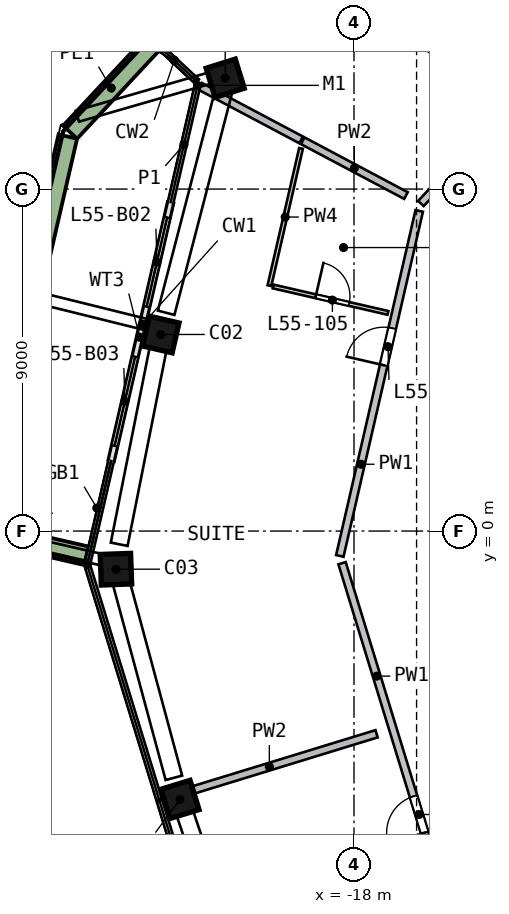
"""IFC4 building model, lengths in metres.
Left out: names, types, materials, properties, quantities, classifications, styles, units other than length and angle.
Written with IfcOpenShell. Run it as: python <this file> out.ifc"""

import sys

from ifc_helpers import new_model, si_unit, direction, frame, frame_2d, origin, origin_2d, place, context, subcontext, project, spatial, rectangle, extrude, element, fill, save


model = new_model("IFC4")
c1 = context("Model", 3, precision=1e-05, world=origin(), true_north=direction((0.0, 1.0)))
c2 = subcontext(c1, "Body", "Model", "MODEL_VIEW")
j1 = project(units=[si_unit("LENGTHUNIT", "METRE"), si_unit("PLANEANGLEUNIT", "RADIAN")], contexts=[c1])
p1 = place(None, origin())
s1 = spatial("IfcSite", under=j1, at=p1, CompositionType="ELEMENT")
p2 = place(p1, origin())
s2 = spatial("IfcBuilding", under=s1, at=p2, CompositionType="ELEMENT")
p3 = place(p2, frame((0.0, 0.0, 227.0)))
s3 = spatial("IfcBuildingStorey", under=s2, at=p3, CompositionType="ELEMENT", Elevation=227.0)
p4 = place(p3, frame((-21.322, 12.039, 0.0), z_axis=(-0.056402373, -0.101858733, 0.993198656), x_axis=(-0.298505491, 0.951000235, 0.080579308)))
e1 = element("IfcColumn", 1, at=p4, inside=s3, PredefinedType="COLUMN", context=c2, shape_type="SweptSolid", body=[
    extrude(rectangle(XDim=0.8, YDim=0.8, at=origin_2d()), origin(), (0.0, 0.0, 1.0), 3.212),
])
p5 = place(p3, frame((-23.056, 5.306, 0.0), z_axis=(-0.024335425, -0.109889655, 0.993645838), x_axis=(-0.223065624, -0.9682844, -0.112547984)))
e2 = element("IfcColumn", 2, at=p5, inside=s3, PredefinedType="COLUMN", context=c2, shape_type="SweptSolid", body=[
    extrude(rectangle(XDim=0.8, YDim=0.8, at=origin_2d()), origin(), (0.0, 0.0, 1.0), 3.21),
])
p6 = place(p3, frame((-24.271, -0.865, 0.0), z_axis=(0.005093486, -0.115401674, 0.993305849), x_axis=(-0.035372235, 0.992676314, 0.115509918)))
e3 = element("IfcColumn", 3, at=p6, inside=s3, PredefinedType="COLUMN", context=c2, shape_type="SweptSolid", body=[
    extrude(rectangle(XDim=0.8, YDim=0.8, at=origin_2d()), origin(), (0.0, 0.0, 1.0), 3.211),
])
p7 = place(p3, frame((-22.62, -6.933, 0.0), z_axis=(0.033841596, -0.107304475, 0.993650087), x_axis=(0.290813838, -0.950141415, -0.112510462)))
e4 = element("IfcColumn", 4, at=p7, inside=s3, PredefinedType="COLUMN", context=c2, shape_type="SweptSolid", body=[
    extrude(rectangle(XDim=0.8, YDim=0.8, at=origin_2d()), origin(), (0.0, 0.0, 1.0), 3.21),
])
p8 = place(p3, frame((-22.827, 8.64, 0.0), z_axis=(0.0, 0.0, 1.0), x_axis=(-0.224302968, -0.97451946, 0.0)))
e5 = element("IfcWall", 5, at=p8, inside=s3, PredefinedType="SOLIDWALL", context=c2, shape_type="SweptSolid", body=[
    extrude(rectangle(XDim=3.3, YDim=0.15, at=frame_2d((1.65, 0.0))), origin(), (0.0, 0.0, 1.0), 2.525),
])
p9 = place(p8, frame((0.4, 0.0, 0.0)))
e6 = element("IfcOpeningElement", 6, at=p9, cuts=e5, PredefinedType="OPENING", context=c2, shape_type="SweptSolid", body=[
    extrude(rectangle(XDim=2.4, YDim=2.4, at=frame_2d((1.2, 1.2))), frame((0.0, 0.085, 0.0), z_axis=(0.0, -1.0, 0.0), x_axis=(1.0, 0.0, 0.0)), (0.0, 0.0, 1.0), 0.17),
])
p10 = place(p3, frame((-23.567, 5.424, 0.0), z_axis=(0.0, 0.0, 1.0), x_axis=(-0.224260426, -0.974529251, 0.0)))
e7 = element("IfcWall", 7, at=p10, inside=s3, PredefinedType="SOLIDWALL", context=c2, shape_type="SweptSolid", body=[
    extrude(rectangle(XDim=3.661, YDim=0.15, at=frame_2d((1.831, 0.0))), origin(), (0.0, 0.0, 1.0), 2.525),
])
p11 = place(p10, frame((0.861, 0.0, 0.0)))
e8 = element("IfcOpeningElement", 8, at=p11, cuts=e7, PredefinedType="OPENING", context=c2, shape_type="SweptSolid", body=[
    extrude(rectangle(XDim=2.4, YDim=2.4, at=frame_2d((1.2, 1.2))), frame((0.0, 0.085, 0.0), z_axis=(0.0, -1.0, 0.0), x_axis=(1.0, 0.0, 0.0)), (0.0, 0.0, 1.0), 0.17),
])
p12 = place(p3, frame((-23.306, 12.819, 0.0), z_axis=(0.0, 0.0, 1.0), x_axis=(-0.681520764, -0.731798776, 0.0)))
e9 = element("IfcWall", 9, at=p12, inside=s3, PredefinedType="SOLIDWALL", context=c2, shape_type="SweptSolid", body=[
    extrude(rectangle(XDim=3.176, YDim=0.5, at=frame_2d((1.588, 0.0))), origin(), (0.0, 0.0, 1.0), 0.7),
])
p13 = place(p3, frame((-25.531, 10.381, 0.0), z_axis=(0.0, 0.0, 1.0), x_axis=(-0.224268414, -0.974527413, 0.0)))
e10 = element("IfcWall", 10, at=p13, inside=s3, PredefinedType="SOLIDWALL", context=c2, shape_type="SweptSolid", body=[
    extrude(rectangle(XDim=10.89, YDim=0.5, at=frame_2d((5.445, 0.0))), origin(), (0.0, 0.0, 1.0), 0.7),
])
p14 = place(p3, frame((-27.673, -0.045, 0.0), z_axis=(0.0, 0.0, 1.0), x_axis=(0.974535819, -0.224231882, 0.0)))
e11 = element("IfcWall", 11, at=p14, inside=s3, PredefinedType="SOLIDWALL", context=c2, shape_type="SweptSolid", body=[
    extrude(rectangle(XDim=2.699, YDim=0.5, at=frame_2d((1.35, 0.0))), origin(), (0.0, 0.0, 1.0), 0.7),
])
p15 = place(p3, frame((-18.373, -0.654, 0.0), z_axis=(0.0, 0.0, 1.0), x_axis=(0.224277617, 0.974525295, 0.0)))
e12 = element("IfcWall", 12, at=p15, inside=s3, PredefinedType="SOLIDWALL", context=c2, shape_type="SweptSolid", body=[
    extrude(rectangle(XDim=9.316, YDim=0.2, at=frame_2d((4.658, 0.0))), origin(), (0.0, 0.0, 1.0), 3.19),
])
p16 = place(p15, frame((5.15, 0.0, 0.0)))
e13 = element("IfcOpeningElement", 13, at=p16, cuts=e12, PredefinedType="OPENING", context=c2, shape_type="SweptSolid", body=[
    extrude(rectangle(XDim=1.0, YDim=2.1, at=frame_2d((0.5, 1.05))), frame((0.0, 0.11, 0.0), z_axis=(0.0, -1.0, 0.0), x_axis=(1.0, 0.0, 0.0)), (0.0, 0.0, 1.0), 0.22),
])
p17 = place(p3, frame((-15.584, -9.753, 0.0), z_axis=(0.0, 0.0, 1.0), x_axis=(-0.293036013, 0.956101404, 0.0)))
e14 = element("IfcWall", 14, at=p17, inside=s3, PredefinedType="SOLIDWALL", context=c2, shape_type="SweptSolid", body=[
    extrude(rectangle(XDim=9.316, YDim=0.2, at=frame_2d((4.658, 0.0))), origin(), (0.0, 0.0, 1.0), 3.19),
])
p18 = place(p17, frame((1.9, 0.0, 0.0)))
e15 = element("IfcOpeningElement", 15, at=p18, cuts=e14, PredefinedType="OPENING", context=c2, shape_type="SweptSolid", body=[
    extrude(rectangle(XDim=1.0, YDim=2.1, at=frame_2d((0.5, 1.05))), frame((0.0, 0.11, 0.0), z_axis=(0.0, -1.0, 0.0), x_axis=(1.0, 0.0, 0.0)), (0.0, 0.0, 1.0), 0.22),
])
p19 = place(p3, frame((-16.239, 8.62, 0.0), z_axis=(0.0, 0.0, 1.0), x_axis=(0.681478707, 0.731837941, 0.0)))
e16 = element("IfcWall", 16, at=p19, inside=s3, PredefinedType="SOLIDWALL", context=c2, shape_type="SweptSolid", body=[
    extrude(rectangle(XDim=9.517, YDim=0.2, at=frame_2d((4.758, 0.0))), origin(), (0.0, 0.0, 1.0), 3.19),
])
p20 = place(p19, frame((3.865, 0.0, 0.0)))
e17 = element("IfcOpeningElement", 17, at=p20, cuts=e16, PredefinedType="OPENING", context=c2, shape_type="SweptSolid", body=[
    extrude(rectangle(XDim=1.8, YDim=2.1, at=frame_2d((0.9, 1.05))), frame((0.0, 0.11, 0.0), z_axis=(0.0, -1.0, 0.0), x_axis=(1.0, 0.0, 0.0)), (0.0, 0.0, 1.0), 0.22),
])
p21 = place(p3, frame((-19.39, 10.292, 0.0), z_axis=(0.0, 0.0, 1.0), x_axis=(-0.883248988, 0.468904281, 0.0)))
e18 = element("IfcWall", 18, at=p21, inside=s3, PredefinedType="SOLIDWALL", context=c2, shape_type="SweptSolid", body=[
    extrude(rectangle(XDim=3.011, YDim=0.2, at=frame_2d((1.506, 0.0))), origin(), (0.0, 0.0, 1.0), 3.19),
])
p22 = place(p3, frame((-17.406, -5.335, 0.0), z_axis=(0.0, 0.0, 1.0), x_axis=(-0.956095937, -0.293053849, 0.0)))
e19 = element("IfcWall", 19, at=p22, inside=s3, PredefinedType="SOLIDWALL", context=c2, shape_type="SweptSolid", body=[
    extrude(rectangle(XDim=5.902, YDim=0.2, at=frame_2d((2.951, 0.0))), origin(), (0.0, 0.0, 1.0), 3.19),
])
p23 = place(p3, frame((-14.229, 11.072, 0.0), z_axis=(0.0, 0.0, 1.0), x_axis=(-0.731837547, 0.68147913, 0.0)))
e20 = element("IfcWall", 20, at=p23, inside=s3, PredefinedType="SOLIDWALL", context=c2, shape_type="SweptSolid", body=[
    extrude(rectangle(XDim=11.533, YDim=0.2, at=frame_2d((5.767, 0.0))), origin(), (0.0, 0.0, 1.0), 3.19),
])
p24 = place(p23, frame((3.45, 0.0, 0.0)))
e21 = element("IfcOpeningElement", 21, at=p24, cuts=e20, PredefinedType="OPENING", context=c2, shape_type="SweptSolid", body=[
    extrude(rectangle(XDim=1.0, YDim=2.1, at=frame_2d((0.5, 1.05))), frame((0.0, 0.11, 0.0), z_axis=(0.0, -1.0, 0.0), x_axis=(1.0, 0.0, 0.0)), (0.0, 0.0, 1.0), 0.22),
])
p25 = place(p3, frame((-16.634, 8.83, 0.0), z_axis=(0.0, 0.0, 1.0), x_axis=(-0.883300707, 0.468806848, 0.0)))
e22 = element("IfcWall", 22, at=p25, inside=s3, PredefinedType="SOLIDWALL", context=c2, shape_type="SweptSolid", body=[
    extrude(rectangle(XDim=3.075, YDim=0.2, at=frame_2d((1.537, 0.0))), origin(), (0.0, 0.0, 1.0), 3.19),
])
p26 = place(p3, frame((-20.225, 6.459, 0.0), z_axis=(0.0, 0.0, 1.0), x_axis=(0.224301063, 0.974519899, 0.0)))
e23 = element("IfcWall", 23, at=p26, inside=s3, PredefinedType="PARTITIONING", context=c2, shape_type="SweptSolid", body=[
    extrude(rectangle(XDim=3.704, YDim=0.1, at=frame_2d((1.852, 0.0))), origin(), (0.0, 0.0, 1.0), 3.19),
])
p27 = place(p3, frame((-20.128, 6.436, 0.0), z_axis=(0.0, 0.0, 1.0), x_axis=(0.974542283, -0.224203788, 0.0)))
e24 = element("IfcWall", 24, at=p27, inside=s3, PredefinedType="PARTITIONING", context=c2, shape_type="SweptSolid", body=[
    extrude(rectangle(XDim=3.1, YDim=0.1, at=frame_2d((1.55, 0.0))), origin(), (0.0, 0.0, 1.0), 3.19),
])
p28 = place(p27, frame((1.15, 0.0, 0.0)))
e25 = element("IfcOpeningElement", 25, at=p28, cuts=e24, PredefinedType="OPENING", context=c2, shape_type="SweptSolid", body=[
    extrude(rectangle(XDim=0.9, YDim=2.1, at=frame_2d((0.45, 1.05))), frame((0.0, 0.06, 0.0), z_axis=(0.0, -1.0, 0.0), x_axis=(1.0, 0.0, 0.0)), (0.0, 0.0, 1.0), 0.12),
])
p29 = place(p9, origin())
e26 = element("IfcDoor", 26, at=p29, inside=s3, OperationType="SLIDING_TO_RIGHT", PredefinedType="DOOR", context=c2, shape_type="SweptSolid", body=[
    extrude(rectangle(XDim=2.4, YDim=2.4, at=frame_2d((1.2, 1.2))), frame((0.0, 0.025, 0.0), z_axis=(0.0, -1.0, 0.0), x_axis=(1.0, 0.0, 0.0)), (0.0, 0.0, 1.0), 0.05),
])
fill(e6, e26)
p30 = place(p11, origin())
e27 = element("IfcDoor", 27, at=p30, inside=s3, OperationType="SLIDING_TO_LEFT", PredefinedType="DOOR", context=c2, shape_type="SweptSolid", body=[
    extrude(rectangle(XDim=2.4, YDim=2.4, at=frame_2d((1.2, 1.2))), frame((0.0, 0.025, 0.0), z_axis=(0.0, -1.0, 0.0), x_axis=(1.0, 0.0, 0.0)), (0.0, 0.0, 1.0), 0.05),
])
fill(e8, e27)
p31 = place(p16, origin())
e28 = element("IfcDoor", 28, at=p31, inside=s3, OperationType="SINGLE_SWING_LEFT", PredefinedType="DOOR", context=c2, shape_type="SweptSolid", body=[
    extrude(rectangle(XDim=1.0, YDim=2.1, at=frame_2d((0.5, 1.05))), frame((0.0, 0.025, 0.0), z_axis=(0.0, -1.0, 0.0), x_axis=(1.0, 0.0, 0.0)), (0.0, 0.0, 1.0), 0.05),
])
fill(e13, e28)
p32 = place(p28, origin())
e29 = element("IfcDoor", 29, at=p32, inside=s3, OperationType="SINGLE_SWING_LEFT", PredefinedType="DOOR", context=c2, shape_type="SweptSolid", body=[
    extrude(rectangle(XDim=0.9, YDim=2.1, at=frame_2d((0.45, 1.05))), frame((0.0, 0.025, 0.0), z_axis=(0.0, -1.0, 0.0), x_axis=(1.0, 0.0, 0.0)), (0.0, 0.0, 1.0), 0.05),
])
fill(e25, e29)
p33 = place(p18, origin())
e30 = element("IfcDoor", 30, at=p33, inside=s3, OperationType="SINGLE_SWING_LEFT", PredefinedType="DOOR", context=c2, shape_type="SweptSolid", body=[
    extrude(rectangle(XDim=1.0, YDim=2.1, at=frame_2d((0.5, 1.05))), frame((0.0, 0.025, 0.0), z_axis=(0.0, -1.0, 0.0), x_axis=(1.0, 0.0, 0.0)), (0.0, 0.0, 1.0), 0.05),
])
fill(e15, e30)
save(model, sys.argv[1])
